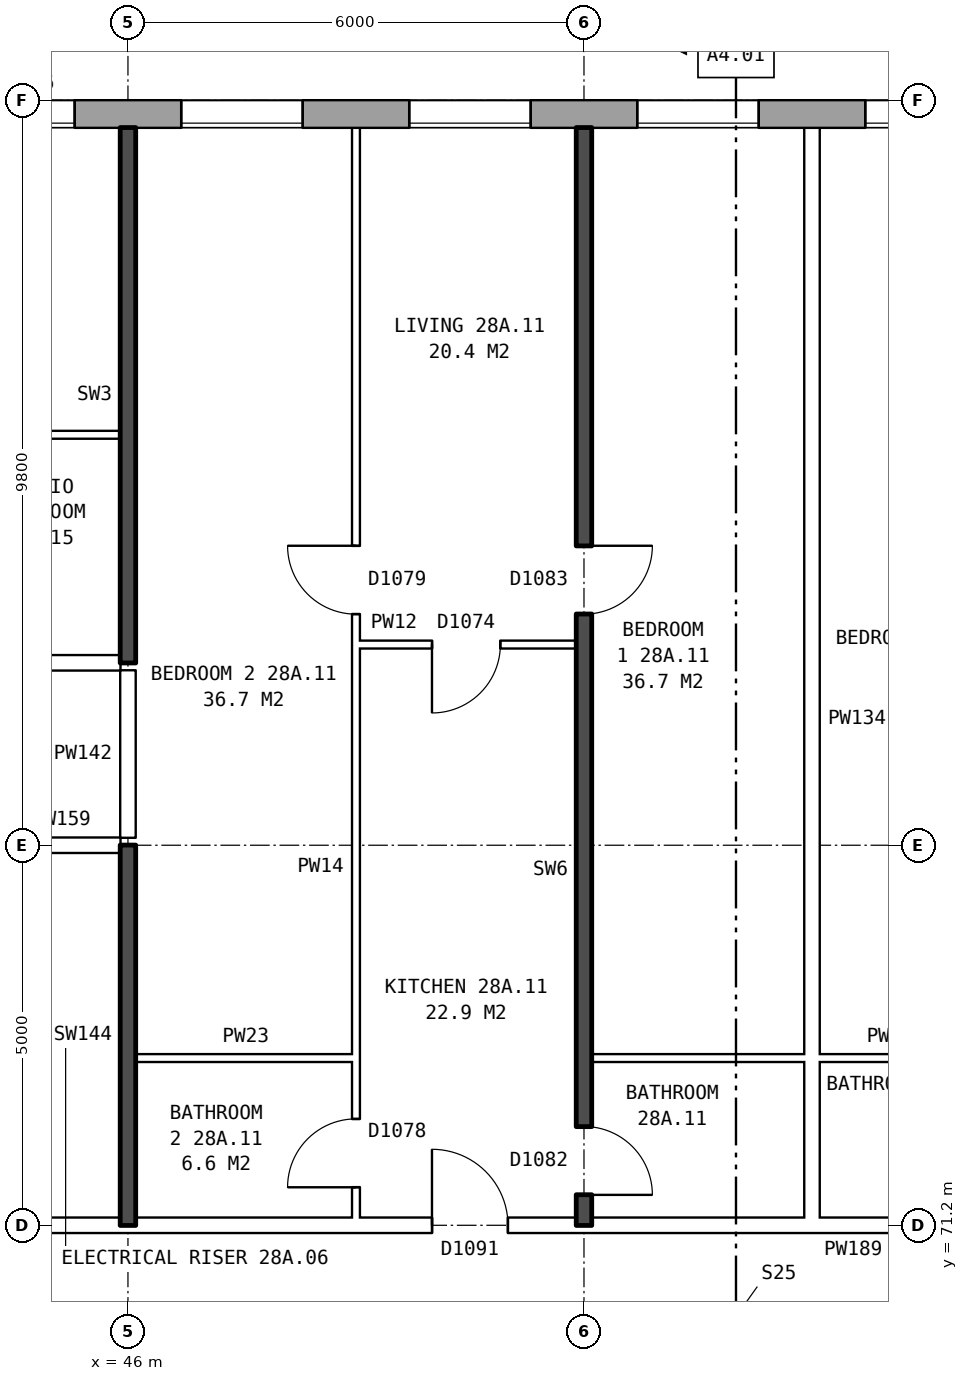
"""IFC4 building model, lengths in metres.
Left out: names, types, materials, properties, quantities, classifications, styles, units other than length and angle.
Written with IfcOpenShell. Run it as: python <this file> out.ifc"""

import sys

from ifc_helpers import new_model, si_unit, direction, frame, frame_2d, origin, place, context, subcontext, project, spatial, rectangle, extrude, element, fill, save


model = new_model("IFC4")
c1 = context("Model", 3, precision=1e-05, world=origin(), true_north=direction((0.0, 1.0)))
c2 = subcontext(c1, "Body", "Model", "MODEL_VIEW")
j1 = project(units=[si_unit("LENGTHUNIT", "METRE"), si_unit("PLANEANGLEUNIT", "RADIAN")], contexts=[c1])
p1 = place(None, origin())
s1 = spatial("IfcSite", under=j1, at=p1, CompositionType="ELEMENT")
p2 = place(p1, origin())
s2 = spatial("IfcBuilding", under=s1, at=p2, CompositionType="ELEMENT")
p3 = place(p2, frame((0.0, 0.0, 102.6)))
s3 = spatial("IfcBuildingStorey", under=s2, at=p3, CompositionType="ELEMENT", Elevation=102.6)
p4 = place(p3, frame((72.925, 85.82, 0.0), z_axis=(0.0, 0.0, 1.0), x_axis=(-1.0, 0.0, 0.0)))
e1 = element("IfcWall", 1, at=p4, inside=s3, PredefinedType="STANDARD", context=c2, shape_type="SweptSolid", body=[
    extrude(rectangle(XDim=44.851, YDim=0.36, at=frame_2d((22.425, 0.0))), origin(), (0.0, 0.0, 1.0), 2.85),
])
p5 = place(p4, frame((0.625, 0.0, 0.8)))
e2 = element("IfcOpeningElement", 2, at=p5, cuts=e1, PredefinedType="OPENING", context=c2, shape_type="SweptSolid", body=[
    extrude(rectangle(XDim=1.6, YDim=1.8, at=frame_2d((0.8, 0.9))), frame((0.0, 0.19, 0.0), z_axis=(0.0, -1.0, 0.0), x_axis=(1.0, 0.0, 0.0)), (0.0, 0.0, 1.0), 0.38),
])
p6 = place(p4, frame((3.625, 0.0, 0.8)))
e3 = element("IfcOpeningElement", 3, at=p6, cuts=e1, PredefinedType="OPENING", context=c2, shape_type="SweptSolid", body=[
    extrude(rectangle(XDim=1.6, YDim=1.8, at=frame_2d((0.8, 0.9))), frame((0.0, 0.19, 0.0), z_axis=(0.0, -1.0, 0.0), x_axis=(1.0, 0.0, 0.0)), (0.0, 0.0, 1.0), 0.38),
])
p7 = place(p4, frame((5.525, 0.0, 0.8)))
e4 = element("IfcOpeningElement", 4, at=p7, cuts=e1, PredefinedType="OPENING", context=c2, shape_type="SweptSolid", body=[
    extrude(rectangle(XDim=0.8, YDim=1.8, at=frame_2d((0.4, 0.9))), frame((0.0, 0.19, 0.0), z_axis=(0.0, -1.0, 0.0), x_axis=(1.0, 0.0, 0.0)), (0.0, 0.0, 1.0), 0.38),
])
p8 = place(p4, frame((9.125, 0.0, 0.8)))
e5 = element("IfcOpeningElement", 5, at=p8, cuts=e1, PredefinedType="OPENING", context=c2, shape_type="SweptSolid", body=[
    extrude(rectangle(XDim=0.6, YDim=0.9, at=frame_2d((0.3, 0.45))), frame((0.0, 0.19, 0.0), z_axis=(0.0, -1.0, 0.0), x_axis=(1.0, 0.0, 0.0)), (0.0, 0.0, 1.0), 0.38),
])
p9 = place(p4, frame((12.625, 0.0, 0.8)))
e6 = element("IfcOpeningElement", 6, at=p9, cuts=e1, PredefinedType="OPENING", context=c2, shape_type="SweptSolid", body=[
    extrude(rectangle(XDim=1.6, YDim=1.8, at=frame_2d((0.8, 0.9))), frame((0.0, 0.19, 0.0), z_axis=(0.0, -1.0, 0.0), x_axis=(1.0, 0.0, 0.0)), (0.0, 0.0, 1.0), 0.38),
])
p10 = place(p4, frame((15.625, 0.0, 0.8)))
e7 = element("IfcOpeningElement", 7, at=p10, cuts=e1, PredefinedType="OPENING", context=c2, shape_type="SweptSolid", body=[
    extrude(rectangle(XDim=1.6, YDim=1.8, at=frame_2d((0.8, 0.9))), frame((0.0, 0.19, 0.0), z_axis=(0.0, -1.0, 0.0), x_axis=(1.0, 0.0, 0.0)), (0.0, 0.0, 1.0), 0.38),
])
p11 = place(p4, frame((18.625, 0.0, 0.8)))
e8 = element("IfcOpeningElement", 8, at=p11, cuts=e1, PredefinedType="OPENING", context=c2, shape_type="SweptSolid", body=[
    extrude(rectangle(XDim=1.6, YDim=1.8, at=frame_2d((0.8, 0.9))), frame((0.0, 0.19, 0.0), z_axis=(0.0, -1.0, 0.0), x_axis=(1.0, 0.0, 0.0)), (0.0, 0.0, 1.0), 0.38),
])
p12 = place(p4, frame((21.625, 0.0, 0.8)))
e9 = element("IfcOpeningElement", 9, at=p12, cuts=e1, PredefinedType="OPENING", context=c2, shape_type="SweptSolid", body=[
    extrude(rectangle(XDim=1.6, YDim=1.8, at=frame_2d((0.8, 0.9))), frame((0.0, 0.19, 0.0), z_axis=(0.0, -1.0, 0.0), x_axis=(1.0, 0.0, 0.0)), (0.0, 0.0, 1.0), 0.38),
])
p13 = place(p4, frame((24.625, 0.0, 0.8)))
e10 = element("IfcOpeningElement", 10, at=p13, cuts=e1, PredefinedType="OPENING", context=c2, shape_type="SweptSolid", body=[
    extrude(rectangle(XDim=1.6, YDim=1.8, at=frame_2d((0.8, 0.9))), frame((0.0, 0.19, 0.0), z_axis=(0.0, -1.0, 0.0), x_axis=(1.0, 0.0, 0.0)), (0.0, 0.0, 1.0), 0.38),
])
p14 = place(p4, frame((27.625, 0.0, 0.8)))
e11 = element("IfcOpeningElement", 11, at=p14, cuts=e1, PredefinedType="OPENING", context=c2, shape_type="SweptSolid", body=[
    extrude(rectangle(XDim=1.6, YDim=1.8, at=frame_2d((0.8, 0.9))), frame((0.0, 0.19, 0.0), z_axis=(0.0, -1.0, 0.0), x_axis=(1.0, 0.0, 0.0)), (0.0, 0.0, 1.0), 0.38),
])
p15 = place(p4, frame((30.625, 0.0, 0.8)))
e12 = element("IfcOpeningElement", 12, at=p15, cuts=e1, PredefinedType="OPENING", context=c2, shape_type="SweptSolid", body=[
    extrude(rectangle(XDim=1.6, YDim=1.8, at=frame_2d((0.8, 0.9))), frame((0.0, 0.19, 0.0), z_axis=(0.0, -1.0, 0.0), x_axis=(1.0, 0.0, 0.0)), (0.0, 0.0, 1.0), 0.38),
])
p16 = place(p4, frame((33.125, 0.0, 0.8)))
e13 = element("IfcOpeningElement", 13, at=p16, cuts=e1, PredefinedType="OPENING", context=c2, shape_type="SweptSolid", body=[
    extrude(rectangle(XDim=1.4, YDim=1.8, at=frame_2d((0.7, 0.9))), frame((0.0, 0.19, 0.0), z_axis=(0.0, -1.0, 0.0), x_axis=(1.0, 0.0, 0.0)), (0.0, 0.0, 1.0), 0.38),
])
p17 = place(p4, frame((34.825, 0.0, 0.8)))
e14 = element("IfcOpeningElement", 14, at=p17, cuts=e1, PredefinedType="OPENING", context=c2, shape_type="SweptSolid", body=[
    extrude(rectangle(XDim=1.0, YDim=0.9, at=frame_2d((0.5, 0.45))), frame((0.0, 0.19, 0.0), z_axis=(0.0, -1.0, 0.0), x_axis=(1.0, 0.0, 0.0)), (0.0, 0.0, 1.0), 0.38),
])
p18 = place(p4, frame((39.625, 0.0, 0.8)))
e15 = element("IfcOpeningElement", 15, at=p18, cuts=e1, PredefinedType="OPENING", context=c2, shape_type="SweptSolid", body=[
    extrude(rectangle(XDim=1.6, YDim=1.8, at=frame_2d((0.8, 0.9))), frame((0.0, 0.19, 0.0), z_axis=(0.0, -1.0, 0.0), x_axis=(1.0, 0.0, 0.0)), (0.0, 0.0, 1.0), 0.38),
])
p19 = place(p4, frame((42.625, 0.0, 0.8)))
e16 = element("IfcOpeningElement", 16, at=p19, cuts=e1, PredefinedType="OPENING", context=c2, shape_type="SweptSolid", body=[
    extrude(rectangle(XDim=1.6, YDim=1.8, at=frame_2d((0.8, 0.9))), frame((0.0, 0.19, 0.0), z_axis=(0.0, -1.0, 0.0), x_axis=(1.0, 0.0, 0.0)), (0.0, 0.0, 1.0), 0.38),
])
p20 = place(p4, frame((6.625, 0.0, 1.7)))
e17 = element("IfcOpeningElement", 17, at=p20, cuts=e1, PredefinedType="OPENING", context=c2, shape_type="SweptSolid", body=[
    extrude(rectangle(XDim=1.0, YDim=0.9, at=frame_2d((0.5, 0.45))), frame((0.0, 0.19, 0.0), z_axis=(0.0, -1.0, 0.0), x_axis=(1.0, 0.0, 0.0)), (0.0, 0.0, 1.0), 0.38),
])
p21 = place(p4, frame((10.175, 0.0, 0.8)))
e18 = element("IfcOpeningElement", 18, at=p21, cuts=e1, PredefinedType="OPENING", context=c2, shape_type="SweptSolid", body=[
    extrude(rectangle(XDim=1.6, YDim=1.8, at=frame_2d((0.8, 0.9))), frame((0.0, 0.19, 0.0), z_axis=(0.0, -1.0, 0.0), x_axis=(1.0, 0.0, 0.0)), (0.0, 0.0, 1.0), 0.38),
])
p22 = place(p4, frame((37.175, 0.0, 1.7)))
e19 = element("IfcOpeningElement", 19, at=p22, cuts=e1, PredefinedType="OPENING", context=c2, shape_type="SweptSolid", body=[
    extrude(rectangle(XDim=0.6, YDim=0.9, at=frame_2d((0.3, 0.45))), frame((0.0, 0.19, 0.0), z_axis=(0.0, -1.0, 0.0), x_axis=(1.0, 0.0, 0.0)), (0.0, 0.0, 1.0), 0.38),
])
p23 = place(p4, frame((38.075, 0.0, 1.1)))
e20 = element("IfcOpeningElement", 20, at=p23, cuts=e1, PredefinedType="OPENING", context=c2, shape_type="SweptSolid", body=[
    extrude(rectangle(XDim=0.6, YDim=1.5, at=frame_2d((0.3, 0.75))), frame((0.0, 0.19, 0.0), z_axis=(0.0, -1.0, 0.0), x_axis=(1.0, 0.0, 0.0)), (0.0, 0.0, 1.0), 0.38),
])
p24 = place(p3, frame((44.36, 71.2, 0.0), z_axis=(0.0, 0.0, 1.0), x_axis=(1.0, 0.0, 0.0)))
e21 = element("IfcWall", 21, at=p24, inside=s3, PredefinedType="PARTITIONING", context=c2, shape_type="SweptSolid", body=[
    extrude(rectangle(XDim=19.28, YDim=0.2, at=frame_2d((9.64, 0.0))), origin(), (0.0, 0.0, 1.0), 2.85),
])
p25 = place(p24, frame((14.64, 0.0, 0.0)))
e22 = element("IfcOpeningElement", 22, at=p25, cuts=e21, PredefinedType="OPENING", context=c2, shape_type="SweptSolid", body=[
    extrude(rectangle(XDim=1.0, YDim=2.1, at=frame_2d((0.5, 1.05))), frame((0.0, 0.11, 0.0), z_axis=(0.0, -1.0, 0.0), x_axis=(1.0, 0.0, 0.0)), (0.0, 0.0, 1.0), 0.22),
])
p26 = place(p24, frame((5.64, 0.0, 0.0)))
e23 = element("IfcOpeningElement", 23, at=p26, cuts=e21, PredefinedType="OPENING", context=c2, shape_type="SweptSolid", body=[
    extrude(rectangle(XDim=1.0, YDim=2.1, at=frame_2d((0.5, 1.05))), frame((0.0, 0.11, 0.0), z_axis=(0.0, -1.0, 0.0), x_axis=(1.0, 0.0, 0.0)), (0.0, 0.0, 1.0), 0.22),
])
p27 = place(p3, frame((46.1, 73.4, 0.0), z_axis=(0.0, 0.0, 1.0), x_axis=(1.0, 0.0, 0.0)))
e24 = element("IfcWall", 24, at=p27, inside=s3, PredefinedType="PARTITIONING", context=c2, shape_type="SweptSolid", body=[
    extrude(rectangle(XDim=2.9, YDim=0.1, at=frame_2d((1.45, 0.0))), origin(), (0.0, 0.0, 1.0), 2.85),
])
p28 = place(p3, frame((52.1, 73.4, 0.0), z_axis=(0.0, 0.0, 1.0), x_axis=(1.0, 0.0, 0.0)))
e25 = element("IfcWall", 25, at=p28, inside=s3, PredefinedType="PARTITIONING", context=c2, shape_type="SweptSolid", body=[
    extrude(rectangle(XDim=5.8, YDim=0.1, at=frame_2d((2.9, 0.0))), origin(), (0.0, 0.0, 1.0), 2.85),
])
p29 = place(p3, frame((44.36, 76.2, 0.0), z_axis=(0.0, 0.0, 1.0), x_axis=(1.0, 0.0, 0.0)))
e26 = element("IfcWall", 26, at=p29, inside=s3, PredefinedType="PARTITIONING", context=c2, shape_type="SweptSolid", body=[
    extrude(rectangle(XDim=1.54, YDim=0.2, at=frame_2d((0.77, 0.0))), origin(), (0.0, 0.0, 1.0), 2.85),
])
p30 = place(p3, frame((25.36, 78.6, 0.0), z_axis=(0.0, 0.0, 1.0), x_axis=(1.0, 0.0, 0.0)))
e27 = element("IfcWall", 27, at=p30, inside=s3, PredefinedType="PARTITIONING", context=c2, shape_type="SweptSolid", body=[
    extrude(rectangle(XDim=20.54, YDim=0.2, at=frame_2d((10.27, 0.0))), origin(), (0.0, 0.0, 1.0), 2.85),
])
p31 = place(p30, frame((15.94, 0.0, 0.0)))
e28 = element("IfcOpeningElement", 28, at=p31, cuts=e27, PredefinedType="OPENING", context=c2, shape_type="SweptSolid", body=[
    extrude(rectangle(XDim=1.0, YDim=2.1, at=frame_2d((0.5, 1.05))), frame((0.0, 0.11, 0.0), z_axis=(0.0, -1.0, 0.0), x_axis=(1.0, 0.0, 0.0)), (0.0, 0.0, 1.0), 0.22),
])
p32 = place(p30, frame((9.94, 0.0, 0.0)))
e29 = element("IfcOpeningElement", 29, at=p32, cuts=e27, PredefinedType="OPENING", context=c2, shape_type="SweptSolid", body=[
    extrude(rectangle(XDim=1.0, YDim=2.1, at=frame_2d((0.5, 1.05))), frame((0.0, 0.11, 0.0), z_axis=(0.0, -1.0, 0.0), x_axis=(1.0, 0.0, 0.0)), (0.0, 0.0, 1.0), 0.22),
])
p33 = place(p30, frame((2.62, 0.0, 0.0)))
e30 = element("IfcOpeningElement", 30, at=p33, cuts=e27, PredefinedType="OPENING", context=c2, shape_type="SweptSolid", body=[
    extrude(rectangle(XDim=1.0, YDim=2.1, at=frame_2d((0.5, 1.05))), frame((0.0, 0.11, 0.0), z_axis=(0.0, -1.0, 0.0), x_axis=(1.0, 0.0, 0.0)), (0.0, 0.0, 1.0), 0.22),
])
p34 = place(p3, frame((49.0, 78.84, 0.0), z_axis=(0.0, 0.0, 1.0), x_axis=(1.0, 0.0, 0.0)))
e31 = element("IfcWall", 31, at=p34, inside=s3, PredefinedType="PARTITIONING", context=c2, shape_type="SweptSolid", body=[
    extrude(rectangle(XDim=2.9, YDim=0.1, at=frame_2d((1.45, 0.0))), origin(), (0.0, 0.0, 1.0), 2.85),
])
p35 = place(p34, frame((1.0, 0.0, 0.0)))
e32 = element("IfcOpeningElement", 32, at=p35, cuts=e31, PredefinedType="OPENING", context=c2, shape_type="SweptSolid", body=[
    extrude(rectangle(XDim=0.9, YDim=2.1, at=frame_2d((0.45, 1.05))), frame((0.0, 0.06, 0.0), z_axis=(0.0, -1.0, 0.0), x_axis=(1.0, 0.0, 0.0)), (0.0, 0.0, 1.0), 0.12),
])
p36 = place(p3, frame((43.6, 81.6, 0.0), z_axis=(0.0, 0.0, 1.0), x_axis=(1.0, 0.0, 0.0)))
e33 = element("IfcWall", 33, at=p36, inside=s3, PredefinedType="PARTITIONING", context=c2, shape_type="SweptSolid", body=[
    extrude(rectangle(XDim=2.3, YDim=0.1, at=frame_2d((1.15, 0.0))), origin(), (0.0, 0.0, 1.0), 2.85),
])
p37 = place(p3, frame((46.0, 71.2, 0.0), z_axis=(0.0, 0.0, 1.0), x_axis=(0.0, 1.0, 0.0)))
e34 = element("IfcWall", 34, at=p37, inside=s3, PredefinedType="SOLIDWALL", context=c2, shape_type="SweptSolid", body=[
    extrude(rectangle(XDim=5.0, YDim=0.2, at=frame_2d((2.5, 0.0))), origin(), (0.0, 0.0, 1.0), 2.85),
])
p38 = place(p3, frame((46.0, 76.3, 0.0), z_axis=(0.0, 0.0, 1.0), x_axis=(0.0, 1.0, 0.0)))
e35 = element("IfcWall", 35, at=p38, inside=s3, PredefinedType="PARTITIONING", context=c2, shape_type="SweptSolid", body=[
    extrude(rectangle(XDim=2.2, YDim=0.2, at=frame_2d((1.1, 0.0))), origin(), (0.0, 0.0, 1.0), 2.85),
])
p39 = place(p3, frame((46.0, 78.6, 0.0), z_axis=(0.0, 0.0, 1.0), x_axis=(0.0, 1.0, 0.0)))
e36 = element("IfcWall", 36, at=p39, inside=s3, PredefinedType="SOLIDWALL", context=c2, shape_type="SweptSolid", body=[
    extrude(rectangle(XDim=7.04, YDim=0.2, at=frame_2d((3.52, 0.0))), origin(), (0.0, 0.0, 1.0), 2.85),
])
p40 = place(p3, frame((49.0, 71.3, 0.0), z_axis=(0.0, 0.0, 1.0), x_axis=(0.0, 1.0, 0.0)))
e37 = element("IfcWall", 37, at=p40, inside=s3, PredefinedType="PARTITIONING", context=c2, shape_type="SweptSolid", body=[
    extrude(rectangle(XDim=14.34, YDim=0.1, at=frame_2d((7.17, 0.0))), origin(), (0.0, 0.0, 1.0), 2.85),
])
p41 = place(p40, frame((7.94, 0.0, 0.0)))
e38 = element("IfcOpeningElement", 38, at=p41, cuts=e37, PredefinedType="OPENING", context=c2, shape_type="SweptSolid", body=[
    extrude(rectangle(XDim=0.9, YDim=2.1, at=frame_2d((0.45, 1.05))), frame((0.0, 0.06, 0.0), z_axis=(0.0, -1.0, 0.0), x_axis=(1.0, 0.0, 0.0)), (0.0, 0.0, 1.0), 0.12),
])
p42 = place(p40, frame((0.4, 0.0, 0.0)))
e39 = element("IfcOpeningElement", 39, at=p42, cuts=e37, PredefinedType="OPENING", context=c2, shape_type="SweptSolid", body=[
    extrude(rectangle(XDim=0.9, YDim=2.1, at=frame_2d((0.45, 1.05))), frame((0.0, 0.06, 0.0), z_axis=(0.0, -1.0, 0.0), x_axis=(1.0, 0.0, 0.0)), (0.0, 0.0, 1.0), 0.12),
])
p43 = place(p3, frame((52.0, 71.2, 0.0), z_axis=(0.0, 0.0, 1.0), x_axis=(0.0, 1.0, 0.0)))
e40 = element("IfcWall", 40, at=p43, inside=s3, PredefinedType="SOLIDWALL", context=c2, shape_type="SweptSolid", body=[
    extrude(rectangle(XDim=14.44, YDim=0.2, at=frame_2d((7.22, 0.0))), origin(), (0.0, 0.0, 1.0), 2.85),
])
p44 = place(p43, frame((8.04, 0.0, 0.0)))
e41 = element("IfcOpeningElement", 41, at=p44, cuts=e40, PredefinedType="OPENING", context=c2, shape_type="SweptSolid", body=[
    extrude(rectangle(XDim=0.9, YDim=2.1, at=frame_2d((0.45, 1.05))), frame((0.0, 0.11, 0.0), z_axis=(0.0, -1.0, 0.0), x_axis=(1.0, 0.0, 0.0)), (0.0, 0.0, 1.0), 0.22),
])
p45 = place(p43, frame((0.4, 0.0, 0.0)))
e42 = element("IfcOpeningElement", 42, at=p45, cuts=e40, PredefinedType="OPENING", context=c2, shape_type="SweptSolid", body=[
    extrude(rectangle(XDim=0.9, YDim=2.1, at=frame_2d((0.45, 1.05))), frame((0.0, 0.11, 0.0), z_axis=(0.0, -1.0, 0.0), x_axis=(1.0, 0.0, 0.0)), (0.0, 0.0, 1.0), 0.22),
])
p46 = place(p3, frame((55.0, 71.3, 0.0), z_axis=(0.0, 0.0, 1.0), x_axis=(0.0, 1.0, 0.0)))
e43 = element("IfcWall", 43, at=p46, inside=s3, PredefinedType="PARTITIONING", context=c2, shape_type="SweptSolid", body=[
    extrude(rectangle(XDim=14.34, YDim=0.2, at=frame_2d((7.17, 0.0))), origin(), (0.0, 0.0, 1.0), 2.85),
])
p47 = place(p10, origin())
e44 = element("IfcWindow", 44, at=p47, inside=s3, PartitioningType="SINGLE_PANEL", PredefinedType="WINDOW", context=c2, shape_type="SweptSolid", body=[
    extrude(rectangle(XDim=1.6, YDim=1.8, at=frame_2d((0.8, 0.9))), frame((0.0, 0.15, 0.0), z_axis=(0.0, -1.0, 0.0), x_axis=(1.0, 0.0, 0.0)), (0.0, 0.0, 1.0), 0.06),
])
fill(e7, e44)
p48 = place(p11, origin())
e45 = element("IfcWindow", 45, at=p48, inside=s3, PartitioningType="SINGLE_PANEL", PredefinedType="WINDOW", context=c2, shape_type="SweptSolid", body=[
    extrude(rectangle(XDim=1.6, YDim=1.8, at=frame_2d((0.8, 0.9))), frame((0.0, 0.15, 0.0), z_axis=(0.0, -1.0, 0.0), x_axis=(1.0, 0.0, 0.0)), (0.0, 0.0, 1.0), 0.06),
])
fill(e8, e45)
p49 = place(p12, origin())
e46 = element("IfcWindow", 46, at=p49, inside=s3, PartitioningType="SINGLE_PANEL", PredefinedType="WINDOW", context=c2, shape_type="SweptSolid", body=[
    extrude(rectangle(XDim=1.6, YDim=1.8, at=frame_2d((0.8, 0.9))), frame((0.0, 0.15, 0.0), z_axis=(0.0, -1.0, 0.0), x_axis=(1.0, 0.0, 0.0)), (0.0, 0.0, 1.0), 0.06),
])
fill(e9, e46)
p50 = place(p13, origin())
e47 = element("IfcWindow", 47, at=p50, inside=s3, PartitioningType="SINGLE_PANEL", PredefinedType="WINDOW", context=c2, shape_type="SweptSolid", body=[
    extrude(rectangle(XDim=1.6, YDim=1.8, at=frame_2d((0.8, 0.9))), frame((0.0, 0.15, 0.0), z_axis=(0.0, -1.0, 0.0), x_axis=(1.0, 0.0, 0.0)), (0.0, 0.0, 1.0), 0.06),
])
fill(e10, e47)
p51 = place(p14, origin())
e48 = element("IfcWindow", 48, at=p51, inside=s3, PartitioningType="SINGLE_PANEL", PredefinedType="WINDOW", context=c2, shape_type="SweptSolid", body=[
    extrude(rectangle(XDim=1.6, YDim=1.8, at=frame_2d((0.8, 0.9))), frame((0.0, 0.15, 0.0), z_axis=(0.0, -1.0, 0.0), x_axis=(1.0, 0.0, 0.0)), (0.0, 0.0, 1.0), 0.06),
])
fill(e11, e48)
p52 = place(p44, frame((0.9, 0.0, 0.0), z_axis=(0.0, 0.0, 1.0), x_axis=(-1.0, 0.0, 0.0)))
e49 = element("IfcDoor", 49, at=p52, inside=s3, OperationType="SINGLE_SWING_LEFT", PredefinedType="DOOR", context=c2, shape_type="SweptSolid", body=[
    extrude(rectangle(XDim=0.9, YDim=2.1, at=frame_2d((0.45, 1.05))), frame((0.0, 0.025, 0.0), z_axis=(0.0, -1.0, 0.0), x_axis=(1.0, 0.0, 0.0)), (0.0, 0.0, 1.0), 0.05),
])
fill(e41, e49)
p53 = place(p41, origin())
e50 = element("IfcDoor", 50, at=p53, inside=s3, OperationType="SINGLE_SWING_RIGHT", PredefinedType="DOOR", context=c2, shape_type="SweptSolid", body=[
    extrude(rectangle(XDim=0.9, YDim=2.1, at=frame_2d((0.45, 1.05))), frame((0.0, 0.025, 0.0), z_axis=(0.0, -1.0, 0.0), x_axis=(1.0, 0.0, 0.0)), (0.0, 0.0, 1.0), 0.05),
])
fill(e38, e50)
p54 = place(p26, origin())
e51 = element("IfcDoor", 51, at=p54, inside=s3, OperationType="SINGLE_SWING_LEFT", PredefinedType="DOOR", context=c2, shape_type="SweptSolid", body=[
    extrude(rectangle(XDim=1.0, YDim=2.1, at=frame_2d((0.5, 1.05))), frame((0.0, 0.025, 0.0), z_axis=(0.0, -1.0, 0.0), x_axis=(1.0, 0.0, 0.0)), (0.0, 0.0, 1.0), 0.05),
])
fill(e23, e51)
p55 = place(p35, frame((0.9, 0.0, 0.0), z_axis=(0.0, 0.0, 1.0), x_axis=(-1.0, 0.0, 0.0)))
e52 = element("IfcDoor", 52, at=p55, inside=s3, OperationType="SINGLE_SWING_RIGHT", PredefinedType="DOOR", context=c2, shape_type="SweptSolid", body=[
    extrude(rectangle(XDim=0.9, YDim=2.1, at=frame_2d((0.45, 1.05))), frame((0.0, 0.025, 0.0), z_axis=(0.0, -1.0, 0.0), x_axis=(1.0, 0.0, 0.0)), (0.0, 0.0, 1.0), 0.05),
])
fill(e32, e52)
p56 = place(p45, frame((0.9, 0.0, 0.0), z_axis=(0.0, 0.0, 1.0), x_axis=(-1.0, 0.0, 0.0)))
e53 = element("IfcDoor", 53, at=p56, inside=s3, OperationType="SINGLE_SWING_RIGHT", PredefinedType="DOOR", context=c2, shape_type="SweptSolid", body=[
    extrude(rectangle(XDim=0.9, YDim=2.1, at=frame_2d((0.45, 1.05))), frame((0.0, 0.025, 0.0), z_axis=(0.0, -1.0, 0.0), x_axis=(1.0, 0.0, 0.0)), (0.0, 0.0, 1.0), 0.05),
])
fill(e42, e53)
p57 = place(p42, origin())
e54 = element("IfcDoor", 54, at=p57, inside=s3, OperationType="SINGLE_SWING_LEFT", PredefinedType="DOOR", context=c2, shape_type="SweptSolid", body=[
    extrude(rectangle(XDim=0.9, YDim=2.1, at=frame_2d((0.45, 1.05))), frame((0.0, 0.025, 0.0), z_axis=(0.0, -1.0, 0.0), x_axis=(1.0, 0.0, 0.0)), (0.0, 0.0, 1.0), 0.05),
])
fill(e39, e54)
save(model, sys.argv[1])
